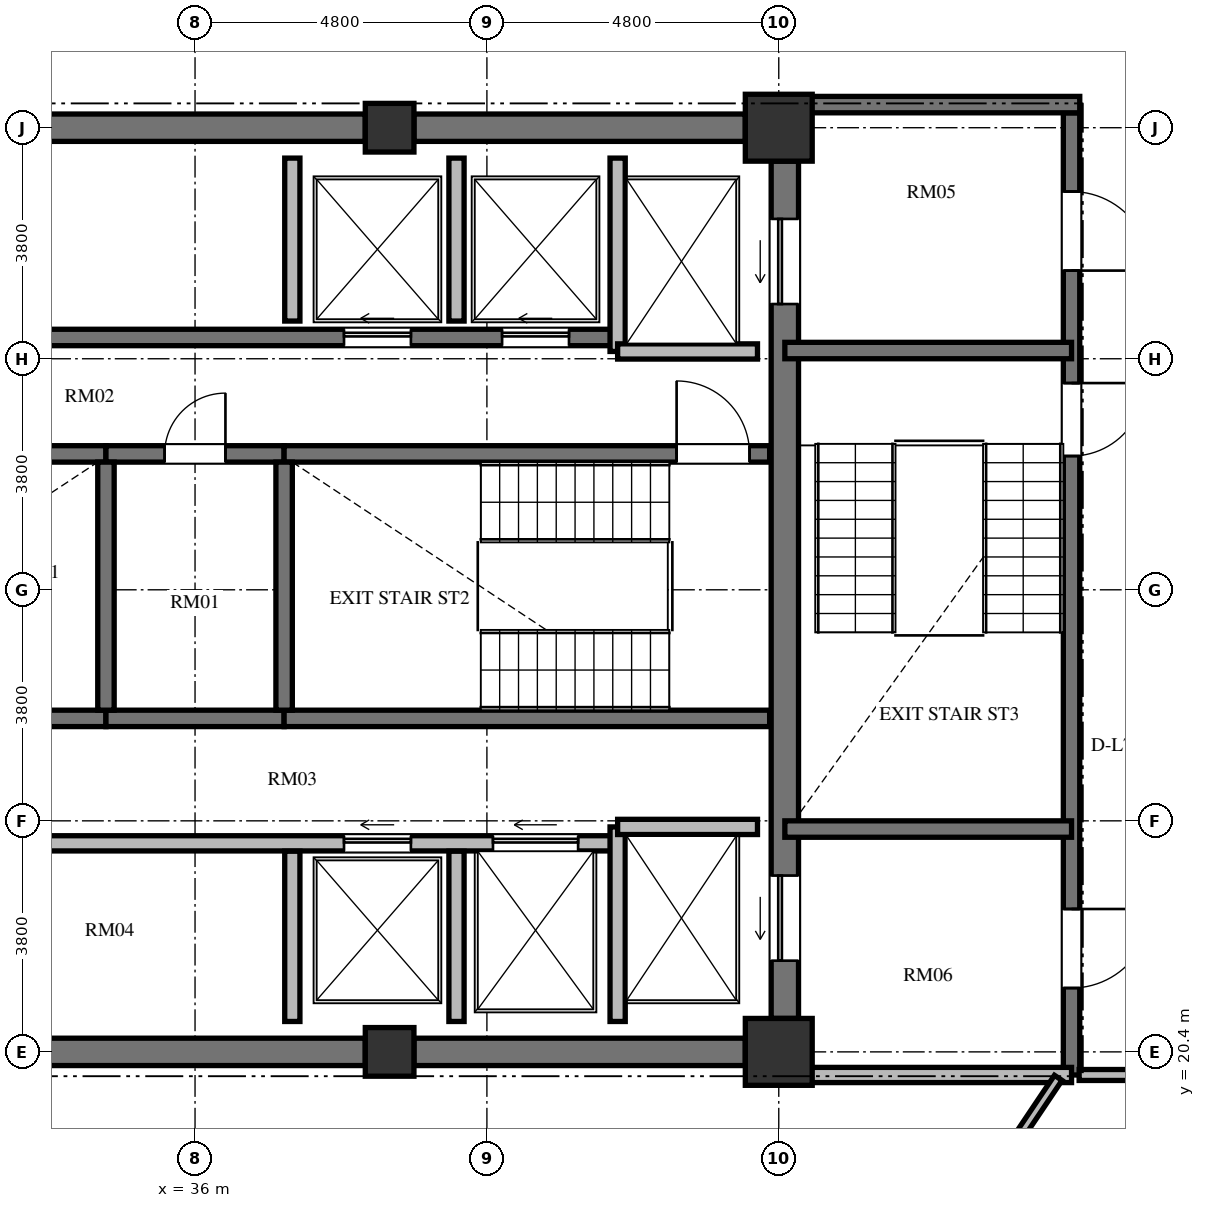
"""IFC4 building model, lengths in metres.
Left out: names, types, materials, properties, quantities, classifications, styles, units other than length and angle.
Written with IfcOpenShell. Run it as: python <this file> out.ifc"""

import sys

from ifc_helpers import new_model, si_unit, direction, frame, frame_2d, origin, origin_2d, place, context, subcontext, project, spatial, rectangle, extrude, element, fill, save


model = new_model("IFC4")
c1 = context("Model", 3, precision=1e-05, world=origin(), true_north=direction((0.0, 1.0)))
c2 = subcontext(c1, "Body", "Model", "MODEL_VIEW")
j1 = project(units=[si_unit("LENGTHUNIT", "METRE"), si_unit("PLANEANGLEUNIT", "RADIAN")], contexts=[c1])
p1 = place(None, origin())
s1 = spatial("IfcSite", under=j1, at=p1, CompositionType="ELEMENT")
p2 = place(p1, origin())
s2 = spatial("IfcBuilding", under=s1, at=p2, CompositionType="ELEMENT")
p3 = place(p2, frame((0.0, 0.0, 291.504)))
s3 = spatial("IfcBuildingStorey", under=s2, at=p3, CompositionType="ELEMENT", Elevation=291.504)
p4 = place(p3, frame((39.2, 20.4, 0.0), z_axis=(0.0, 0.0, 1.0), x_axis=(1.0, 0.0, 0.0)))
e1 = element("IfcColumn", 1, at=p4, inside=s3, PredefinedType="COLUMN", context=c2, shape_type="SweptSolid", body=[
    extrude(rectangle(XDim=0.8, YDim=0.8, at=origin_2d()), origin(), (0.0, 0.0, 1.0), 3.648),
])
for number, where, z_axis, x_axis in (
    (2, (45.6, 20.4, 0.0), (0.0, 0.0, 1.0), (1.0, 0.0, 0.0)),
    (3, (45.6, 35.6, 0.0), (0.0, 0.0, 1.0), (1.0, 0.0, 0.0)),
):
    element("IfcColumn", number, at=place(p3, frame(where, z_axis=z_axis, x_axis=x_axis)), inside=s3, PredefinedType="COLUMN", context=c2, shape_type="SweptSolid", body=[
        extrude(rectangle(XDim=1.1, YDim=1.1, at=origin_2d()), origin(), (0.0, 0.0, 1.0), 3.648),
    ])
p5 = place(p3, frame((39.2, 35.6, 0.0), z_axis=(0.0, 0.0, 1.0), x_axis=(1.0, 0.0, 0.0)))
e4 = element("IfcColumn", 4, at=p5, inside=s3, PredefinedType="COLUMN", context=c2, shape_type="SweptSolid", body=[
    extrude(rectangle(XDim=0.8, YDim=0.8, at=origin_2d()), origin(), (0.0, 0.0, 1.0), 3.648),
])
p6 = place(p3, frame((45.7, 20.95, 0.0), z_axis=(0.0, 0.0, 1.0), x_axis=(0.0, 1.0, 0.0)))
e5 = element("IfcWall", 5, at=p6, inside=s3, PredefinedType="SHEAR", context=c2, shape_type="SweptSolid", body=[
    extrude(rectangle(XDim=14.1, YDim=0.45, at=frame_2d((7.05, 0.0))), origin(), (0.0, 0.0, 1.0), 3.648),
])
p7 = place(p6, frame((11.75, 0.0, 0.0)))
e6 = element("IfcOpeningElement", 6, at=p7, cuts=e5, PredefinedType="OPENING", context=c2, shape_type="SweptSolid", body=[
    extrude(rectangle(XDim=1.4, YDim=2.3, at=frame_2d((0.7, 1.15))), frame((0.0, 0.235, 0.0), z_axis=(0.0, -1.0, 0.0), x_axis=(1.0, 0.0, 0.0)), (0.0, 0.0, 1.0), 0.47),
])
p8 = place(p6, frame((0.95, 0.0, 0.0)))
e7 = element("IfcOpeningElement", 7, at=p8, cuts=e5, PredefinedType="OPENING", context=c2, shape_type="SweptSolid", body=[
    extrude(rectangle(XDim=1.4, YDim=2.3, at=frame_2d((0.7, 1.15))), frame((0.0, 0.235, 0.0), z_axis=(0.0, -1.0, 0.0), x_axis=(1.0, 0.0, 0.0)), (0.0, 0.0, 1.0), 0.47),
])
for number, where, z_axis, x_axis in (
    (8, (33.2, 20.4, 0.0), (0.0, 0.0, 1.0), (1.0, 0.0, 0.0)),
    (9, (33.2, 35.6, 0.0), (0.0, 0.0, 1.0), (1.0, 0.0, 0.0)),
):
    element("IfcWall", number, at=place(p3, frame(where, z_axis=z_axis, x_axis=x_axis)), inside=s3, PredefinedType="SHEAR", context=c2, shape_type="SweptSolid", body=[
        extrude(rectangle(XDim=5.6, YDim=0.45, at=frame_2d((2.8, 0.0))), origin(), (0.0, 0.0, 1.0), 3.648),
    ])
for number, where, z_axis, x_axis in (
    (10, (39.6, 20.4, 0.0), (0.0, 0.0, 1.0), (1.0, 0.0, 0.0)),
    (11, (39.6, 35.6, 0.0), (0.0, 0.0, 1.0), (1.0, 0.0, 0.0)),
):
    element("IfcWall", number, at=place(p3, frame(where, z_axis=z_axis, x_axis=x_axis)), inside=s3, PredefinedType="SHEAR", context=c2, shape_type="SweptSolid", body=[
        extrude(rectangle(XDim=5.45, YDim=0.45, at=frame_2d((2.725, 0.0))), origin(), (0.0, 0.0, 1.0), 3.648),
    ])
p9 = place(p3, frame((26.55, 30.235, 0.0), z_axis=(0.0, 0.0, 1.0), x_axis=(1.0, 0.0, 0.0)))
e12 = element("IfcWall", 12, at=p9, inside=s3, PredefinedType="SHEAR", context=c2, shape_type="SweptSolid", body=[
    extrude(rectangle(XDim=7.985, YDim=0.27, at=frame_2d((3.992, 0.0))), origin(), (0.0, 0.0, 1.0), 3.648),
])
p10 = place(p3, frame((34.535, 30.235, 0.0), z_axis=(0.0, 0.0, 1.0), x_axis=(1.0, 0.0, 0.0)))
e13 = element("IfcWall", 13, at=p10, inside=s3, PredefinedType="SHEAR", context=c2, shape_type="SweptSolid", body=[
    extrude(rectangle(XDim=2.93, YDim=0.27, at=frame_2d((1.465, 0.0))), origin(), (0.0, 0.0, 1.0), 3.648),
])
p11 = place(p10, frame((0.965, 0.0, 0.0)))
e14 = element("IfcOpeningElement", 14, at=p11, cuts=e13, PredefinedType="OPENING", context=c2, shape_type="SweptSolid", body=[
    extrude(rectangle(XDim=1.0, YDim=2.1, at=frame_2d((0.5, 1.05))), frame((0.0, 0.145, 0.0), z_axis=(0.0, -1.0, 0.0), x_axis=(1.0, 0.0, 0.0)), (0.0, 0.0, 1.0), 0.29),
])
p12 = place(p3, frame((37.465, 30.235, 0.0), z_axis=(0.0, 0.0, 1.0), x_axis=(1.0, 0.0, 0.0)))
e15 = element("IfcWall", 15, at=p12, inside=s3, PredefinedType="SHEAR", context=c2, shape_type="SweptSolid", body=[
    extrude(rectangle(XDim=7.985, YDim=0.27, at=frame_2d((3.992, 0.0))), origin(), (0.0, 0.0, 1.0), 3.648),
])
p13 = place(p12, frame((6.455, 0.0, 0.0)))
e16 = element("IfcOpeningElement", 16, at=p13, cuts=e15, PredefinedType="OPENING", context=c2, shape_type="SweptSolid", body=[
    extrude(rectangle(XDim=1.2, YDim=2.15, at=frame_2d((0.6, 1.075))), frame((0.0, 0.145, 0.0), z_axis=(0.0, -1.0, 0.0), x_axis=(1.0, 0.0, 0.0)), (0.0, 0.0, 1.0), 0.29),
])
p14 = place(p3, frame((26.55, 25.885, 0.0), z_axis=(0.0, 0.0, 1.0), x_axis=(1.0, 0.0, 0.0)))
e17 = element("IfcWall", 17, at=p14, inside=s3, PredefinedType="SHEAR", context=c2, shape_type="SweptSolid", body=[
    extrude(rectangle(XDim=7.985, YDim=0.27, at=frame_2d((3.992, 0.0))), origin(), (0.0, 0.0, 1.0), 3.648),
])
p15 = place(p3, frame((34.535, 25.885, 0.0), z_axis=(0.0, 0.0, 1.0), x_axis=(1.0, 0.0, 0.0)))
e18 = element("IfcWall", 18, at=p15, inside=s3, PredefinedType="SHEAR", context=c2, shape_type="SweptSolid", body=[
    extrude(rectangle(XDim=2.93, YDim=0.27, at=frame_2d((1.465, 0.0))), origin(), (0.0, 0.0, 1.0), 3.648),
])
p16 = place(p3, frame((37.465, 25.885, 0.0), z_axis=(0.0, 0.0, 1.0), x_axis=(1.0, 0.0, 0.0)))
e19 = element("IfcWall", 19, at=p16, inside=s3, PredefinedType="SHEAR", context=c2, shape_type="SweptSolid", body=[
    extrude(rectangle(XDim=7.985, YDim=0.27, at=frame_2d((3.992, 0.0))), origin(), (0.0, 0.0, 1.0), 3.648),
])
for number, where, z_axis, x_axis in (
    (20, (34.535, 26.02, 0.0), (0.0, 0.0, 1.0), (0.0, 1.0, 0.0)),
    (21, (37.465, 26.02, 0.0), (0.0, 0.0, 1.0), (0.0, 1.0, 0.0)),
):
    element("IfcWall", number, at=place(p3, frame(where, z_axis=z_axis, x_axis=x_axis)), inside=s3, PredefinedType="SHEAR", context=c2, shape_type="SweptSolid", body=[
        extrude(rectangle(XDim=4.08, YDim=0.27, at=frame_2d((2.04, 0.0))), origin(), (0.0, 0.0, 1.0), 3.648),
    ])
p17 = place(p3, frame((26.55, 32.15, 0.0), z_axis=(0.0, 0.0, 1.0), x_axis=(1.0, 0.0, 0.0)))
e22 = element("IfcWall", 22, at=p17, inside=s3, PredefinedType="SHEAR", context=c2, shape_type="SweptSolid", body=[
    extrude(rectangle(XDim=16.4, YDim=0.27, at=frame_2d((8.2, 0.0))), origin(), (0.0, 0.0, 1.0), 3.648),
])
p18 = place(p17, frame((5.125, 0.0, 0.0)))
e23 = element("IfcOpeningElement", 23, at=p18, cuts=e22, PredefinedType="OPENING", context=c2, shape_type="SweptSolid", body=[
    extrude(rectangle(XDim=1.05, YDim=2.15, at=frame_2d((0.525, 1.075))), frame((0.0, 0.145, 0.0), z_axis=(0.0, -1.0, 0.0), x_axis=(1.0, 0.0, 0.0)), (0.0, 0.0, 1.0), 0.29),
])
p19 = place(p17, frame((11.9, 0.0, 0.0)))
e24 = element("IfcOpeningElement", 24, at=p19, cuts=e22, PredefinedType="OPENING", context=c2, shape_type="SweptSolid", body=[
    extrude(rectangle(XDim=1.1, YDim=2.2, at=frame_2d((0.55, 1.1))), frame((0.0, 0.145, 0.0), z_axis=(0.0, -1.0, 0.0), x_axis=(1.0, 0.0, 0.0)), (0.0, 0.0, 1.0), 0.29),
])
p20 = place(p17, frame((14.5, 0.0, 0.0)))
e25 = element("IfcOpeningElement", 25, at=p20, cuts=e22, PredefinedType="OPENING", context=c2, shape_type="SweptSolid", body=[
    extrude(rectangle(XDim=1.1, YDim=2.2, at=frame_2d((0.55, 1.1))), frame((0.0, 0.145, 0.0), z_axis=(0.0, -1.0, 0.0), x_axis=(1.0, 0.0, 0.0)), (0.0, 0.0, 1.0), 0.29),
])
p21 = place(p3, frame((26.75, 23.83, 0.0), z_axis=(0.0, 0.0, 1.0), x_axis=(1.0, 0.0, 0.0)))
e26 = element("IfcWall", 26, at=p21, inside=s3, PredefinedType="SOLIDWALL", context=c2, shape_type="SweptSolid", body=[
    extrude(rectangle(XDim=16.2, YDim=0.25, at=frame_2d((8.1, 0.0))), origin(), (0.0, 0.0, 1.0), 3.448),
])
p22 = place(p21, frame((4.75, 0.0, 0.0)))
e27 = element("IfcOpeningElement", 27, at=p22, cuts=e26, PredefinedType="OPENING", context=c2, shape_type="SweptSolid", body=[
    extrude(rectangle(XDim=1.4, YDim=2.2, at=frame_2d((0.7, 1.1))), frame((0.0, 0.135, 0.0), z_axis=(0.0, -1.0, 0.0), x_axis=(1.0, 0.0, 0.0)), (0.0, 0.0, 1.0), 0.27),
])
p23 = place(p21, frame((11.7, 0.0, 0.0)))
e28 = element("IfcOpeningElement", 28, at=p23, cuts=e26, PredefinedType="OPENING", context=c2, shape_type="SweptSolid", body=[
    extrude(rectangle(XDim=1.1, YDim=2.2, at=frame_2d((0.55, 1.1))), frame((0.0, 0.135, 0.0), z_axis=(0.0, -1.0, 0.0), x_axis=(1.0, 0.0, 0.0)), (0.0, 0.0, 1.0), 0.27),
])
p24 = place(p21, frame((14.15, 0.0, 0.0)))
e29 = element("IfcOpeningElement", 29, at=p24, cuts=e26, PredefinedType="OPENING", context=c2, shape_type="SweptSolid", body=[
    extrude(rectangle(XDim=1.4, YDim=2.3, at=frame_2d((0.7, 1.15))), frame((0.0, 0.135, 0.0), z_axis=(0.0, -1.0, 0.0), x_axis=(1.0, 0.0, 0.0)), (0.0, 0.0, 1.0), 0.27),
])
p25 = place(p3, frame((42.95, 31.92, 0.0), z_axis=(0.0, 0.0, 1.0), x_axis=(0.0, 1.0, 0.0)))
e30 = element("IfcWall", 30, at=p25, inside=s3, PredefinedType="SOLIDWALL", context=c2, shape_type="SweptSolid", body=[
    extrude(rectangle(XDim=3.18, YDim=0.25, at=frame_2d((1.59, 0.0))), origin(), (0.0, 0.0, 1.0), 3.448),
])
p26 = place(p3, frame((42.95, 31.92, 0.0), z_axis=(0.0, 0.0, 1.0), x_axis=(1.0, 0.0, 0.0)))
e31 = element("IfcWall", 31, at=p26, inside=s3, PredefinedType="SOLIDWALL", context=c2, shape_type="SweptSolid", body=[
    extrude(rectangle(XDim=2.3, YDim=0.25, at=frame_2d((1.15, 0.0))), origin(), (0.0, 0.0, 1.0), 3.448),
])
p27 = place(p3, frame((42.95, 20.9, 0.0), z_axis=(0.0, 0.0, 1.0), x_axis=(0.0, 1.0, 0.0)))
e32 = element("IfcWall", 32, at=p27, inside=s3, PredefinedType="SOLIDWALL", context=c2, shape_type="SweptSolid", body=[
    extrude(rectangle(XDim=3.2, YDim=0.25, at=frame_2d((1.6, 0.0))), origin(), (0.0, 0.0, 1.0), 3.448),
])
p28 = place(p3, frame((42.95, 24.1, 0.0), z_axis=(0.0, 0.0, 1.0), x_axis=(1.0, 0.0, 0.0)))
e33 = element("IfcWall", 33, at=p28, inside=s3, PredefinedType="SOLIDWALL", context=c2, shape_type="SweptSolid", body=[
    extrude(rectangle(XDim=2.3, YDim=0.25, at=frame_2d((1.15, 0.0))), origin(), (0.0, 0.0, 1.0), 3.448),
])
p29 = place(p3, frame((37.6, 32.42, 0.0), z_axis=(0.0, 0.0, 1.0), x_axis=(0.0, 1.0, 0.0)))
e34 = element("IfcWall", 34, at=p29, inside=s3, PredefinedType="SOLIDWALL", context=c2, shape_type="SweptSolid", body=[
    extrude(rectangle(XDim=2.68, YDim=0.25, at=frame_2d((1.34, 0.0))), origin(), (0.0, 0.0, 1.0), 3.448),
])
p30 = place(p3, frame((37.6, 20.9, 0.0), z_axis=(0.0, 0.0, 1.0), x_axis=(0.0, 1.0, 0.0)))
e35 = element("IfcWall", 35, at=p30, inside=s3, PredefinedType="SOLIDWALL", context=c2, shape_type="SweptSolid", body=[
    extrude(rectangle(XDim=2.8, YDim=0.25, at=frame_2d((1.4, 0.0))), origin(), (0.0, 0.0, 1.0), 3.448),
])
p31 = place(p3, frame((40.3, 32.42, 0.0), z_axis=(0.0, 0.0, 1.0), x_axis=(0.0, 1.0, 0.0)))
e36 = element("IfcWall", 36, at=p31, inside=s3, PredefinedType="SOLIDWALL", context=c2, shape_type="SweptSolid", body=[
    extrude(rectangle(XDim=2.68, YDim=0.25, at=frame_2d((1.34, 0.0))), origin(), (0.0, 0.0, 1.0), 3.448),
])
p32 = place(p3, frame((40.3, 20.9, 0.0), z_axis=(0.0, 0.0, 1.0), x_axis=(0.0, 1.0, 0.0)))
e37 = element("IfcWall", 37, at=p32, inside=s3, PredefinedType="SOLIDWALL", context=c2, shape_type="SweptSolid", body=[
    extrude(rectangle(XDim=2.8, YDim=0.25, at=frame_2d((1.4, 0.0))), origin(), (0.0, 0.0, 1.0), 3.448),
])
p33 = place(p3, frame((50.415, 35.845, 0.0), z_axis=(0.0, 0.0, 1.0), x_axis=(0.0, -1.0, 0.0)))
e38 = element("IfcWall", 38, at=p33, inside=s3, PredefinedType="SHEAR", context=c2, shape_type="SweptSolid", body=[
    extrude(rectangle(XDim=15.825, YDim=0.27, at=frame_2d((7.913, 0.0))), origin(), (0.0, 0.0, 1.0), 3.648),
])
p34 = place(p33, frame((4.445, 0.0, 0.0)))
e39 = element("IfcOpeningElement", 39, at=p34, cuts=e38, PredefinedType="OPENING", context=c2, shape_type="SweptSolid", body=[
    extrude(rectangle(XDim=1.2, YDim=2.15, at=frame_2d((0.6, 1.075))), frame((0.0, 0.145, 0.0), z_axis=(0.0, -1.0, 0.0), x_axis=(1.0, 0.0, 0.0)), (0.0, 0.0, 1.0), 0.29),
])
p35 = place(p33, frame((1.295, 0.0, 0.0)))
e40 = element("IfcOpeningElement", 40, at=p35, cuts=e38, PredefinedType="OPENING", context=c2, shape_type="SweptSolid", body=[
    extrude(rectangle(XDim=1.3, YDim=2.2, at=frame_2d((0.65, 1.1))), frame((0.0, 0.145, 0.0), z_axis=(0.0, -1.0, 0.0), x_axis=(1.0, 0.0, 0.0)), (0.0, 0.0, 1.0), 0.29),
])
p36 = place(p33, frame((13.095, 0.0, 0.0)))
e41 = element("IfcOpeningElement", 41, at=p36, cuts=e38, PredefinedType="OPENING", context=c2, shape_type="SweptSolid", body=[
    extrude(rectangle(XDim=1.3, YDim=2.2, at=frame_2d((0.65, 1.1))), frame((0.0, 0.145, 0.0), z_axis=(0.0, -1.0, 0.0), x_axis=(1.0, 0.0, 0.0)), (0.0, 0.0, 1.0), 0.29),
])
p37 = place(p3, frame((45.925, 35.98, 0.0), z_axis=(0.0, 0.0, 1.0), x_axis=(1.0, 0.0, 0.0)))
e42 = element("IfcWall", 42, at=p37, inside=s3, PredefinedType="SHEAR", context=c2, shape_type="SweptSolid", body=[
    extrude(rectangle(XDim=4.625, YDim=0.27, at=frame_2d((2.312, 0.0))), origin(), (0.0, 0.0, 1.0), 3.648),
])
for number, where, z_axis, x_axis in (
    (43, (45.7, 31.935, 0.0), (0.0, 0.0, 1.0), (1.0, 0.0, 0.0)),
    (44, (45.7, 24.065, 0.0), (0.0, 0.0, 1.0), (1.0, 0.0, 0.0)),
):
    element("IfcWall", number, at=place(p3, frame(where, z_axis=z_axis, x_axis=x_axis)), inside=s3, PredefinedType="SHEAR", context=c2, shape_type="SweptSolid", body=[
        extrude(rectangle(XDim=4.715, YDim=0.27, at=frame_2d((2.357, 0.0))), origin(), (0.0, 0.0, 1.0), 3.648),
    ])
p38 = place(p3, frame((45.7, 20.02, 0.0), z_axis=(0.0, 0.0, 1.0), x_axis=(1.0, 0.0, 0.0)))
e45 = element("IfcWall", 45, at=p38, inside=s3, PredefinedType="SOLIDWALL", context=c2, shape_type="SweptSolid", body=[
    extrude(rectangle(XDim=4.715, YDim=0.25, at=frame_2d((2.357, 0.0))), origin(), (0.0, 0.0, 1.0), 3.448),
])
p39 = place(p3, frame((52.358, 20.02, 0.0), z_axis=(0.0, 0.0, 1.0), x_axis=(-1.0, 0.0, 0.0)))
e46 = element("IfcWall", 46, at=p39, inside=s3, PredefinedType="PARTITIONING", context=c2, shape_type="SweptSolid", body=[
    extrude(rectangle(XDim=1.818, YDim=0.18, at=frame_2d((0.909, 0.0))), origin(), (0.0, 0.0, 1.0), 3.448),
])
p40 = place(p3, frame((50.196, 19.973, 0.0), z_axis=(0.0, 0.0, 1.0), x_axis=(-0.557432490255, -0.830222270725, 0.0)))
e47 = element("IfcWall", 47, at=p40, inside=s3, PredefinedType="PARTITIONING", context=c2, shape_type="SweptSolid", body=[
    extrude(rectangle(XDim=5.664, YDim=0.15, at=frame_2d((2.832, 0.0))), origin(), (0.0, 0.0, 1.0), 3.448),
])
p41 = place(p13, origin())
e48 = element("IfcDoor", 48, at=p41, inside=s3, OperationType="SINGLE_SWING_LEFT", PredefinedType="DOOR", context=c2, shape_type="SweptSolid", body=[
    extrude(rectangle(XDim=1.2, YDim=2.15, at=frame_2d((0.6, 1.075))), frame((0.0, 0.025, 0.0), z_axis=(0.0, -1.0, 0.0), x_axis=(1.0, 0.0, 0.0)), (0.0, 0.0, 1.0), 0.05),
])
fill(e16, e48)
p42 = place(p11, origin())
e49 = element("IfcDoor", 49, at=p42, inside=s3, OperationType="SINGLE_SWING_RIGHT", PredefinedType="DOOR", context=c2, shape_type="SweptSolid", body=[
    extrude(rectangle(XDim=1.0, YDim=2.1, at=frame_2d((0.5, 1.05))), frame((0.0, 0.025, 0.0), z_axis=(0.0, -1.0, 0.0), x_axis=(1.0, 0.0, 0.0)), (0.0, 0.0, 1.0), 0.05),
])
fill(e14, e49)
p43 = place(p19, origin())
e50 = element("IfcDoor", 50, at=p43, inside=s3, OperationType="SLIDING_TO_LEFT", PredefinedType="DOOR", context=c2, shape_type="SweptSolid", body=[
    extrude(rectangle(XDim=1.1, YDim=2.2, at=frame_2d((0.55, 1.1))), frame((0.0, 0.025, 0.0), z_axis=(0.0, -1.0, 0.0), x_axis=(1.0, 0.0, 0.0)), (0.0, 0.0, 1.0), 0.05),
])
fill(e24, e50)
p44 = place(p20, origin())
e51 = element("IfcDoor", 51, at=p44, inside=s3, OperationType="SLIDING_TO_LEFT", PredefinedType="DOOR", context=c2, shape_type="SweptSolid", body=[
    extrude(rectangle(XDim=1.1, YDim=2.2, at=frame_2d((0.55, 1.1))), frame((0.0, 0.025, 0.0), z_axis=(0.0, -1.0, 0.0), x_axis=(1.0, 0.0, 0.0)), (0.0, 0.0, 1.0), 0.05),
])
fill(e25, e51)
p45 = place(p23, origin())
e52 = element("IfcDoor", 52, at=p45, inside=s3, OperationType="SLIDING_TO_LEFT", PredefinedType="DOOR", context=c2, shape_type="SweptSolid", body=[
    extrude(rectangle(XDim=1.1, YDim=2.2, at=frame_2d((0.55, 1.1))), frame((0.0, 0.025, 0.0), z_axis=(0.0, -1.0, 0.0), x_axis=(1.0, 0.0, 0.0)), (0.0, 0.0, 1.0), 0.05),
])
fill(e28, e52)
p46 = place(p7, origin())
e53 = element("IfcDoor", 53, at=p46, inside=s3, OperationType="SLIDING_TO_LEFT", PredefinedType="DOOR", context=c2, shape_type="SweptSolid", body=[
    extrude(rectangle(XDim=1.4, YDim=2.3, at=frame_2d((0.7, 1.15))), frame((0.0, 0.025, 0.0), z_axis=(0.0, -1.0, 0.0), x_axis=(1.0, 0.0, 0.0)), (0.0, 0.0, 1.0), 0.05),
])
fill(e6, e53)
p47 = place(p8, origin())
e54 = element("IfcDoor", 54, at=p47, inside=s3, OperationType="SLIDING_TO_LEFT", PredefinedType="DOOR", context=c2, shape_type="SweptSolid", body=[
    extrude(rectangle(XDim=1.4, YDim=2.3, at=frame_2d((0.7, 1.15))), frame((0.0, 0.025, 0.0), z_axis=(0.0, -1.0, 0.0), x_axis=(1.0, 0.0, 0.0)), (0.0, 0.0, 1.0), 0.05),
])
fill(e7, e54)
p48 = place(p24, origin())
e55 = element("IfcDoor", 55, at=p48, inside=s3, OperationType="SLIDING_TO_LEFT", PredefinedType="DOOR", context=c2, shape_type="SweptSolid", body=[
    extrude(rectangle(XDim=1.4, YDim=2.3, at=frame_2d((0.7, 1.15))), frame((0.0, 0.025, 0.0), z_axis=(0.0, -1.0, 0.0), x_axis=(1.0, 0.0, 0.0)), (0.0, 0.0, 1.0), 0.05),
])
fill(e29, e55)
p49 = place(p34, origin())
e56 = element("IfcDoor", 56, at=p49, inside=s3, OperationType="SINGLE_SWING_LEFT", PredefinedType="DOOR", context=c2, shape_type="SweptSolid", body=[
    extrude(rectangle(XDim=1.2, YDim=2.15, at=frame_2d((0.6, 1.075))), frame((0.0, 0.025, 0.0), z_axis=(0.0, -1.0, 0.0), x_axis=(1.0, 0.0, 0.0)), (0.0, 0.0, 1.0), 0.05),
])
fill(e39, e56)
p50 = place(p35, origin())
e57 = element("IfcDoor", 57, at=p50, inside=s3, OperationType="SINGLE_SWING_RIGHT", PredefinedType="DOOR", context=c2, shape_type="SweptSolid", body=[
    extrude(rectangle(XDim=1.3, YDim=2.2, at=frame_2d((0.65, 1.1))), frame((0.0, 0.025, 0.0), z_axis=(0.0, -1.0, 0.0), x_axis=(1.0, 0.0, 0.0)), (0.0, 0.0, 1.0), 0.05),
])
fill(e40, e57)
p51 = place(p36, origin())
e58 = element("IfcDoor", 58, at=p51, inside=s3, OperationType="SINGLE_SWING_LEFT", PredefinedType="DOOR", context=c2, shape_type="SweptSolid", body=[
    extrude(rectangle(XDim=1.3, YDim=2.2, at=frame_2d((0.65, 1.1))), frame((0.0, 0.025, 0.0), z_axis=(0.0, -1.0, 0.0), x_axis=(1.0, 0.0, 0.0)), (0.0, 0.0, 1.0), 0.05),
])
fill(e41, e58)
save(model, sys.argv[1])
